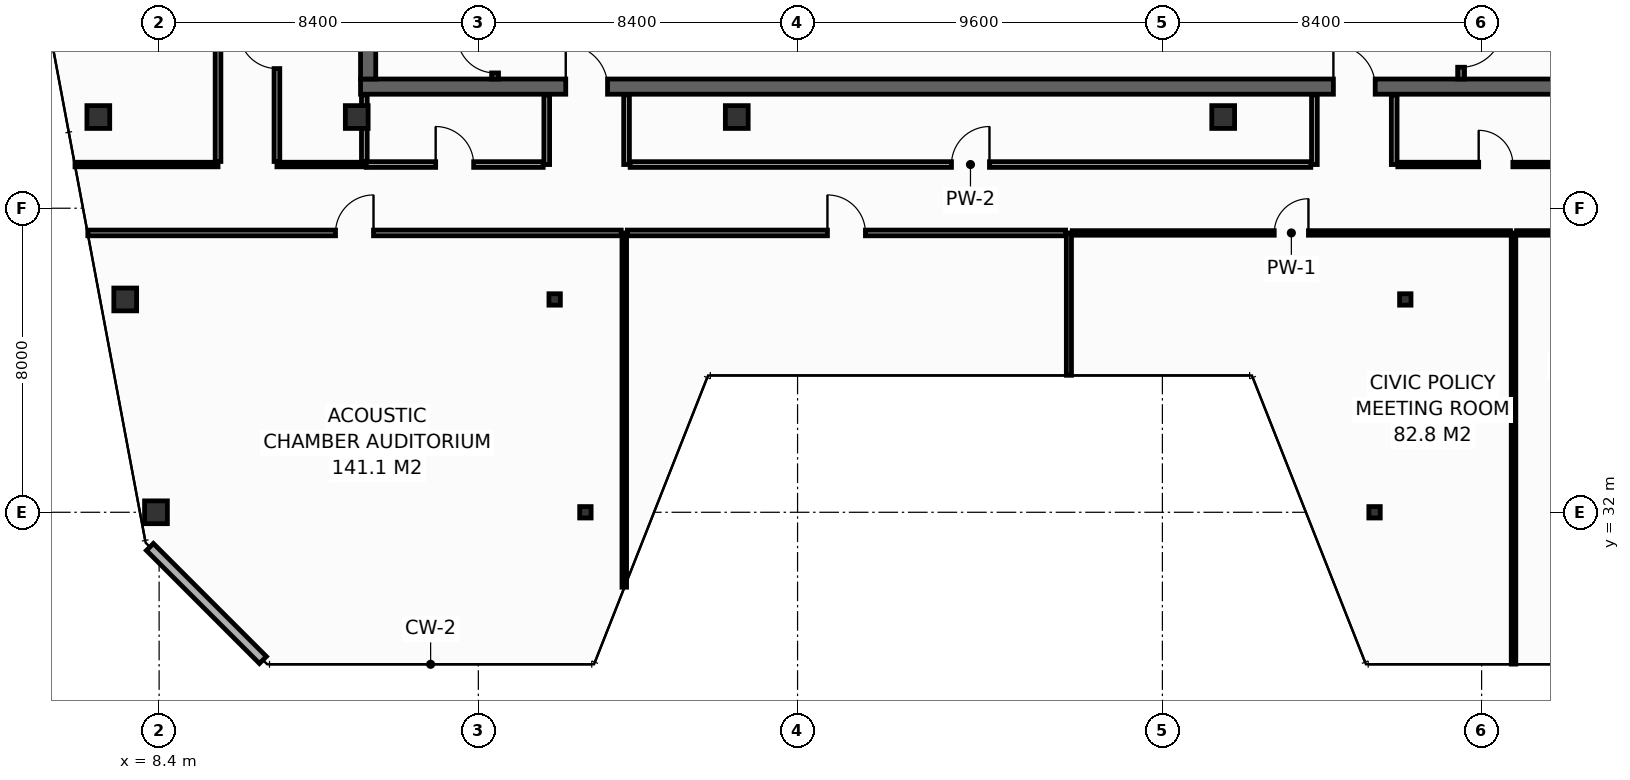
"""IFC4 building model, lengths in metres.
Left out: names, types, materials, properties, quantities, classifications, styles, units other than length and angle.
Written with IfcOpenShell. Run it as: python <this file> out.ifc"""

import sys

from ifc_helpers import new_model, si_unit, direction, frame, frame_2d, origin, origin_2d, place, context, subcontext, project, spatial, rectangle, hollow_rectangle, extrude, element, fill, save


model = new_model("IFC4")
c1 = context("Model", 3, precision=1e-05, world=origin(), true_north=direction((0.0, 1.0)))
c2 = subcontext(c1, "Body", "Model", "MODEL_VIEW")
j1 = project(units=[si_unit("LENGTHUNIT", "METRE"), si_unit("PLANEANGLEUNIT", "RADIAN")], contexts=[c1])
p1 = place(None, origin())
s1 = spatial("IfcSite", under=j1, at=p1, CompositionType="ELEMENT")
p2 = place(p1, origin())
s2 = spatial("IfcBuilding", under=s1, at=p2, CompositionType="ELEMENT")
p3 = place(p2, frame((0.0, 0.0, 287.6)))
s3 = spatial("IfcBuildingStorey", under=s2, at=p3, CompositionType="ELEMENT", Elevation=287.6)
p4 = place(p3, frame((13.7, 43.2, 0.0), z_axis=(0.0, 0.0, 1.0), x_axis=(1.0, 0.0, 0.0)))
e1 = element("IfcWall", 1, at=p4, inside=s3, PredefinedType="SHEAR", context=c2, shape_type="SweptSolid", body=[
    extrude(rectangle(XDim=32.5, YDim=0.4, at=frame_2d((16.25, 0.0))), origin(), (0.0, 0.0, 1.0), 3.55),
])
p5 = place(p4, frame((5.4, 0.0, 0.0)))
e2 = element("IfcOpeningElement", 2, at=p5, cuts=e1, PredefinedType="OPENING", context=c2, shape_type="SweptSolid", body=[
    extrude(rectangle(XDim=1.1, YDim=2.15, at=frame_2d((0.55, 1.075))), frame((0.0, 0.21, 0.0), z_axis=(0.0, -1.0, 0.0), x_axis=(1.0, 0.0, 0.0)), (0.0, 0.0, 1.0), 0.42),
])
p6 = place(p4, frame((25.6, 0.0, 0.0)))
e3 = element("IfcOpeningElement", 3, at=p6, cuts=e1, PredefinedType="OPENING", context=c2, shape_type="SweptSolid", body=[
    extrude(rectangle(XDim=1.1, YDim=2.15, at=frame_2d((0.55, 1.075))), frame((0.0, 0.21, 0.0), z_axis=(0.0, -1.0, 0.0), x_axis=(1.0, 0.0, 0.0)), (0.0, 0.0, 1.0), 0.42),
])
p7 = place(p3, frame((13.9, 43.4, 0.0), z_axis=(0.0, 0.0, 1.0), x_axis=(0.0, 1.0, 0.0)))
e4 = element("IfcWall", 4, at=p7, inside=s3, PredefinedType="SHEAR", context=c2, shape_type="SweptSolid", body=[
    extrude(rectangle(XDim=10.4, YDim=0.4, at=frame_2d((5.2, 0.0))), origin(), (0.0, 0.0, 1.0), 3.55),
])
for number, where, z_axis, x_axis in (
    (5, (6.8, 42.4, 0.0), (0.0, 0.0, 1.0), (1.0, 0.0, 0.0)),
    (6, (13.6, 42.4, 0.0), (0.0, 0.0, 1.0), (1.0, 0.0, 0.0)),
    (7, (23.6, 42.4, 0.0), (0.0, 0.0, 1.0), (1.0, 0.0, 0.0)),
    (8, (36.4, 42.4, 0.0), (0.0, 0.0, 1.0), (1.0, 0.0, 0.0)),
    (9, (8.317, 32.0, 0.0), (0.0, 0.0, 1.0), (1.0, 0.0, 0.0)),
):
    element("IfcColumn", number, at=place(p3, frame(where, z_axis=z_axis, x_axis=x_axis)), inside=s3, PredefinedType="COLUMN", context=c2, shape_type="SweptSolid", body=[
        extrude(hollow_rectangle(XDim=0.6, YDim=0.6, WallThickness=0.028, at=origin_2d()), origin(), (0.0, 0.0, 1.0), 3.8),
    ])
for number, where, z_axis, x_axis in (
    (10, (19.617, 32.0, 0.0), (0.0, 0.0, 1.0), (1.0, 0.0, 0.0)),
    (11, (40.383, 32.0, 0.0), (0.0, 0.0, 1.0), (1.0, 0.0, 0.0)),
):
    element("IfcColumn", number, at=place(p3, frame(where, z_axis=z_axis, x_axis=x_axis)), inside=s3, PredefinedType="COLUMN", context=c2, shape_type="SweptSolid", body=[
        extrude(hollow_rectangle(XDim=0.3, YDim=0.3, WallThickness=0.012, at=origin_2d()), origin(), (0.0, 0.0, 1.0), 3.8),
    ])
p8 = place(p3, frame((7.508, 37.6, 0.0), z_axis=(0.0, 0.0, 1.0), x_axis=(1.0, 0.0, 0.0)))
e12 = element("IfcColumn", 12, at=p8, inside=s3, PredefinedType="COLUMN", context=c2, shape_type="SweptSolid", body=[
    extrude(hollow_rectangle(XDim=0.6, YDim=0.6, WallThickness=0.028, at=origin_2d()), origin(), (0.0, 0.0, 1.0), 3.8),
])
for number, where, z_axis, x_axis in (
    (13, (18.808, 37.6, 0.0), (0.0, 0.0, 1.0), (1.0, 0.0, 0.0)),
    (14, (41.192, 37.6, 0.0), (0.0, 0.0, 1.0), (1.0, 0.0, 0.0)),
):
    element("IfcColumn", number, at=place(p3, frame(where, z_axis=z_axis, x_axis=x_axis)), inside=s3, PredefinedType="COLUMN", context=c2, shape_type="SweptSolid", body=[
        extrude(hollow_rectangle(XDim=0.3, YDim=0.3, WallThickness=0.012, at=origin_2d()), origin(), (0.0, 0.0, 1.0), 3.8),
    ])
p9 = place(p3, frame((17.24, 43.4, 0.0), z_axis=(0.0, 0.0, 1.0), x_axis=(0.0, 1.0, 0.0)))
e15 = element("IfcWall", 15, at=p9, inside=s3, PredefinedType="SHEAR", context=c2, shape_type="SweptSolid", body=[
    extrude(rectangle(XDim=10.4, YDim=0.18, at=frame_2d((5.2, 0.0))), origin(), (0.0, 0.0, 1.0), 3.55),
])
p10 = place(p9, frame((0.16, 0.0, 0.0)))
e16 = element("IfcOpeningElement", 16, at=p10, cuts=e15, PredefinedType="OPENING", context=c2, shape_type="SweptSolid", body=[
    extrude(rectangle(XDim=1.0, YDim=2.15, at=frame_2d((0.5, 1.075))), frame((0.0, 0.1, 0.0), z_axis=(0.0, -1.0, 0.0), x_axis=(1.0, 0.0, 0.0)), (0.0, 0.0, 1.0), 0.2),
])
p11 = place(p3, frame((42.66, 53.8, 0.0), z_axis=(0.0, 0.0, 1.0), x_axis=(0.0, -1.0, 0.0)))
e17 = element("IfcWall", 17, at=p11, inside=s3, PredefinedType="SHEAR", context=c2, shape_type="SweptSolid", body=[
    extrude(rectangle(XDim=10.4, YDim=0.18, at=frame_2d((5.2, 0.0))), origin(), (0.0, 0.0, 1.0), 3.55),
])
p12 = place(p11, frame((8.99, 0.0, 0.0)))
e18 = element("IfcOpeningElement", 18, at=p12, cuts=e17, PredefinedType="OPENING", context=c2, shape_type="SweptSolid", body=[
    extrude(rectangle(XDim=1.1, YDim=2.15, at=frame_2d((0.55, 1.075))), frame((0.0, 0.1, 0.0), z_axis=(0.0, -1.0, 0.0), x_axis=(1.0, 0.0, 0.0)), (0.0, 0.0, 1.0), 0.2),
])
p13 = place(p3, frame((8.157, 31.087, 0.0), z_axis=(0.0, 0.0, 1.0), x_axis=(0.707106781187, -0.707106781187, 0.0)))
e19 = element("IfcWall", 19, at=p13, inside=s3, PredefinedType="STANDARD", context=c2, shape_type="SweptSolid", body=[
    extrude(rectangle(XDim=4.206, YDim=0.26, at=frame_2d((2.103, 0.0))), origin(), (0.0, 0.0, 1.0), 3.55),
])
p14 = place(p3, frame((6.186, 41.15, 0.0), z_axis=(0.0, 0.0, 1.0), x_axis=(1.0, 0.0, 0.0)))
e20 = element("IfcWall", 20, at=p14, inside=s3, PredefinedType="PARTITIONING", context=c2, shape_type="SweptSolid", body=[
    extrude(rectangle(XDim=3.764, YDim=0.12, at=frame_2d((1.882, 0.0))), origin(), (0.0, 0.0, 1.0), 3.085),
])
p15 = place(p3, frame((11.5, 41.15, 0.0), z_axis=(0.0, 0.0, 1.0), x_axis=(1.0, 0.0, 0.0)))
e21 = element("IfcWall", 21, at=p15, inside=s3, PredefinedType="PARTITIONING", context=c2, shape_type="SweptSolid", body=[
    extrude(rectangle(XDim=2.35, YDim=0.12, at=frame_2d((1.175, 0.0))), origin(), (0.0, 0.0, 1.0), 3.55),
])
p16 = place(p3, frame((9.95, 41.23, 0.0), z_axis=(0.0, 0.0, 1.0), x_axis=(0.0, 1.0, 0.0)))
e22 = element("IfcWall", 22, at=p16, inside=s3, PredefinedType="PARTITIONING", context=c2, shape_type="SweptSolid", body=[
    extrude(rectangle(XDim=8.29, YDim=0.15, at=frame_2d((4.145, 0.0))), origin(), (0.0, 0.0, 1.0), 2.947),
])
p17 = place(p16, frame((3.645, 0.0, 0.0)))
e23 = element("IfcOpeningElement", 23, at=p17, cuts=e22, PredefinedType="OPENING", context=c2, shape_type="SweptSolid", body=[
    extrude(rectangle(XDim=1.0, YDim=2.15, at=frame_2d((0.5, 1.075))), frame((0.0, 0.085, 0.0), z_axis=(0.0, -1.0, 0.0), x_axis=(1.0, 0.0, 0.0)), (0.0, 0.0, 1.0), 0.17),
])
p18 = place(p3, frame((11.5, 41.23, 0.0), z_axis=(0.0, 0.0, 1.0), x_axis=(0.0, 1.0, 0.0)))
e24 = element("IfcWall", 24, at=p18, inside=s3, PredefinedType="PARTITIONING", context=c2, shape_type="SweptSolid", body=[
    extrude(rectangle(XDim=5.89, YDim=0.15, at=frame_2d((2.945, 0.0))), origin(), (0.0, 0.0, 1.0), 2.947),
])
p19 = place(p18, frame((2.445, 0.0, 0.0)))
e25 = element("IfcOpeningElement", 25, at=p19, cuts=e24, PredefinedType="OPENING", context=c2, shape_type="SweptSolid", body=[
    extrude(rectangle(XDim=1.0, YDim=2.15, at=frame_2d((0.5, 1.075))), frame((0.0, 0.085, 0.0), z_axis=(0.0, -1.0, 0.0), x_axis=(1.0, 0.0, 0.0)), (0.0, 0.0, 1.0), 0.17),
])
p20 = place(p3, frame((13.8, 41.23, 0.0), z_axis=(0.0, 0.0, 1.0), x_axis=(0.0, 1.0, 0.0)))
e26 = element("IfcWall", 26, at=p20, inside=s3, PredefinedType="PARTITIONING", context=c2, shape_type="SweptSolid", body=[
    extrude(rectangle(XDim=1.75, YDim=0.15, at=frame_2d((0.875, 0.0))), origin(), (0.0, 0.0, 1.0), 3.55),
])
for number, where, z_axis, x_axis in (
    (27, (18.6, 41.15, 0.0), (0.0, 0.0, 1.0), (0.0, 1.0, 0.0)),
    (28, (20.7, 41.15, 0.0), (0.0, 0.0, 1.0), (0.0, 1.0, 0.0)),
    (29, (38.8, 41.15, 0.0), (0.0, 0.0, 1.0), (0.0, 1.0, 0.0)),
    (30, (40.9, 41.15, 0.0), (0.0, 0.0, 1.0), (0.0, 1.0, 0.0)),
):
    element("IfcWall", number, at=place(p3, frame(where, z_axis=z_axis, x_axis=x_axis)), inside=s3, PredefinedType="PARTITIONING", context=c2, shape_type="SweptSolid", body=[
        extrude(rectangle(XDim=1.83, YDim=0.15, at=frame_2d((0.915, 0.0))), origin(), (0.0, 0.0, 1.0), 3.55),
    ])
p21 = place(p3, frame((13.85, 41.15, 0.0), z_axis=(0.0, 0.0, 1.0), x_axis=(1.0, 0.0, 0.0)))
e31 = element("IfcWall", 31, at=p21, inside=s3, PredefinedType="PARTITIONING", context=c2, shape_type="SweptSolid", body=[
    extrude(rectangle(XDim=4.655, YDim=0.15, at=frame_2d((2.327, 0.0))), origin(), (0.0, 0.0, 1.0), 3.55),
])
p22 = place(p21, frame((1.827, 0.0, 0.0)))
e32 = element("IfcOpeningElement", 32, at=p22, cuts=e31, PredefinedType="OPENING", context=c2, shape_type="SweptSolid", body=[
    extrude(rectangle(XDim=1.0, YDim=2.15, at=frame_2d((0.5, 1.075))), frame((0.0, 0.085, 0.0), z_axis=(0.0, -1.0, 0.0), x_axis=(1.0, 0.0, 0.0)), (0.0, 0.0, 1.0), 0.17),
])
p23 = place(p3, frame((20.795, 41.15, 0.0), z_axis=(0.0, 0.0, 1.0), x_axis=(1.0, 0.0, 0.0)))
e33 = element("IfcWall", 33, at=p23, inside=s3, PredefinedType="PARTITIONING", context=c2, shape_type="SweptSolid", body=[
    extrude(rectangle(XDim=17.91, YDim=0.15, at=frame_2d((8.955, 0.0))), origin(), (0.0, 0.0, 1.0), 3.047),
])
p24 = place(p23, frame((8.455, 0.0, 0.0)))
e34 = element("IfcOpeningElement", 34, at=p24, cuts=e33, PredefinedType="OPENING", context=c2, shape_type="SweptSolid", body=[
    extrude(rectangle(XDim=1.0, YDim=2.15, at=frame_2d((0.5, 1.075))), frame((0.0, 0.085, 0.0), z_axis=(0.0, -1.0, 0.0), x_axis=(1.0, 0.0, 0.0)), (0.0, 0.0, 1.0), 0.17),
])
p25 = place(p3, frame((40.995, 41.15, 0.0), z_axis=(0.0, 0.0, 1.0), x_axis=(1.0, 0.0, 0.0)))
e35 = element("IfcWall", 35, at=p25, inside=s3, PredefinedType="PARTITIONING", context=c2, shape_type="SweptSolid", body=[
    extrude(rectangle(XDim=5.155, YDim=0.12, at=frame_2d((2.577, 0.0))), origin(), (0.0, 0.0, 1.0), 3.55),
])
p26 = place(p25, frame((2.128, 0.0, 0.0)))
e36 = element("IfcOpeningElement", 36, at=p26, cuts=e35, PredefinedType="OPENING", context=c2, shape_type="SweptSolid", body=[
    extrude(rectangle(XDim=0.9, YDim=2.1, at=frame_2d((0.45, 1.05))), frame((0.0, 0.07, 0.0), z_axis=(0.0, -1.0, 0.0), x_axis=(1.0, 0.0, 0.0)), (0.0, 0.0, 1.0), 0.14),
])
p27 = place(p3, frame((20.64, 30.029, 0.0), z_axis=(0.0, 0.0, 1.0), x_axis=(0.0, 1.0, 0.0)))
e37 = element("IfcWall", 37, at=p27, inside=s3, PredefinedType="PARTITIONING", context=c2, shape_type="SweptSolid", body=[
    extrude(rectangle(XDim=9.321, YDim=0.12, at=frame_2d((4.661, 0.0))), origin(), (0.0, 0.0, 1.0), 3.047),
])
p28 = place(p3, frame((32.34, 35.605, 0.0), z_axis=(0.0, 0.0, 1.0), x_axis=(0.0, 1.0, 0.0)))
e38 = element("IfcWall", 38, at=p28, inside=s3, PredefinedType="PARTITIONING", context=c2, shape_type="SweptSolid", body=[
    extrude(rectangle(XDim=3.745, YDim=0.135, at=frame_2d((1.873, 0.0))), origin(), (0.0, 0.0, 1.0), 3.55),
])
p29 = place(p3, frame((44.04, 28.005, 0.0), z_axis=(0.0, 0.0, 1.0), x_axis=(0.0, 1.0, 0.0)))
e39 = element("IfcWall", 39, at=p29, inside=s3, PredefinedType="PARTITIONING", context=c2, shape_type="SweptSolid", body=[
    extrude(rectangle(XDim=11.345, YDim=0.12, at=frame_2d((5.673, 0.0))), origin(), (0.0, 0.0, 1.0), 3.047),
])
p30 = place(p3, frame((6.523, 39.35, 0.0), z_axis=(0.0, 0.0, 1.0), x_axis=(1.0, 0.0, 0.0)))
e40 = element("IfcWall", 40, at=p30, inside=s3, PredefinedType="PARTITIONING", context=c2, shape_type="SweptSolid", body=[
    extrude(rectangle(XDim=14.037, YDim=0.15, at=frame_2d((7.018, 0.0))), origin(), (0.0, 0.0, 1.0), 3.047),
])
p31 = place(p30, frame((6.518, 0.0, 0.0)))
e41 = element("IfcOpeningElement", 41, at=p31, cuts=e40, PredefinedType="OPENING", context=c2, shape_type="SweptSolid", body=[
    extrude(rectangle(XDim=1.0, YDim=2.15, at=frame_2d((0.5, 1.075))), frame((0.0, 0.085, 0.0), z_axis=(0.0, -1.0, 0.0), x_axis=(1.0, 0.0, 0.0)), (0.0, 0.0, 1.0), 0.17),
])
p32 = place(p3, frame((20.72, 39.35, 0.0), z_axis=(0.0, 0.0, 1.0), x_axis=(1.0, 0.0, 0.0)))
e42 = element("IfcWall", 42, at=p32, inside=s3, PredefinedType="PARTITIONING", context=c2, shape_type="SweptSolid", body=[
    extrude(rectangle(XDim=11.532, YDim=0.15, at=frame_2d((5.766, 0.0))), origin(), (0.0, 0.0, 1.0), 3.047),
])
p33 = place(p32, frame((5.266, 0.0, 0.0)))
e43 = element("IfcOpeningElement", 43, at=p33, cuts=e42, PredefinedType="OPENING", context=c2, shape_type="SweptSolid", body=[
    extrude(rectangle(XDim=1.0, YDim=2.15, at=frame_2d((0.5, 1.075))), frame((0.0, 0.085, 0.0), z_axis=(0.0, -1.0, 0.0), x_axis=(1.0, 0.0, 0.0)), (0.0, 0.0, 1.0), 0.17),
])
p34 = place(p3, frame((32.427, 39.35, 0.0), z_axis=(0.0, 0.0, 1.0), x_axis=(1.0, 0.0, 0.0)))
e44 = element("IfcWall", 44, at=p34, inside=s3, PredefinedType="PARTITIONING", context=c2, shape_type="SweptSolid", body=[
    extrude(rectangle(XDim=11.532, YDim=0.12, at=frame_2d((5.766, 0.0))), origin(), (0.0, 0.0, 1.0), 3.047),
])
p35 = place(p34, frame((5.316, 0.0, 0.0)))
e45 = element("IfcOpeningElement", 45, at=p35, cuts=e44, PredefinedType="OPENING", context=c2, shape_type="SweptSolid", body=[
    extrude(rectangle(XDim=0.9, YDim=2.1, at=frame_2d((0.45, 1.05))), frame((0.0, 0.07, 0.0), z_axis=(0.0, -1.0, 0.0), x_axis=(1.0, 0.0, 0.0)), (0.0, 0.0, 1.0), 0.14),
])
p36 = place(p3, frame((44.12, 39.35, 0.0), z_axis=(0.0, 0.0, 1.0), x_axis=(1.0, 0.0, 0.0)))
e46 = element("IfcWall", 46, at=p36, inside=s3, PredefinedType="PARTITIONING", context=c2, shape_type="SweptSolid", body=[
    extrude(rectangle(XDim=9.356, YDim=0.12, at=frame_2d((4.678, 0.0))), origin(), (0.0, 0.0, 1.0), 3.085),
])
p37 = place(p36, frame((4.228, 0.0, 0.0)))
e47 = element("IfcOpeningElement", 47, at=p37, cuts=e46, PredefinedType="OPENING", context=c2, shape_type="SweptSolid", body=[
    extrude(rectangle(XDim=0.9, YDim=2.1, at=frame_2d((0.45, 1.05))), frame((0.0, 0.07, 0.0), z_axis=(0.0, -1.0, 0.0), x_axis=(1.0, 0.0, 0.0)), (0.0, 0.0, 1.0), 0.14),
])
p38 = place(p10, origin())
e48 = element("IfcDoor", 48, at=p38, inside=s3, OperationType="SINGLE_SWING_RIGHT", PredefinedType="DOOR", context=c2, shape_type="SweptSolid", body=[
    extrude(rectangle(XDim=1.0, YDim=2.15, at=frame_2d((0.5, 1.075))), frame((0.0, 0.025, 0.0), z_axis=(0.0, -1.0, 0.0), x_axis=(1.0, 0.0, 0.0)), (0.0, 0.0, 1.0), 0.05),
])
fill(e16, e48)
p39 = place(p12, origin())
e49 = element("IfcDoor", 49, at=p39, inside=s3, OperationType="SINGLE_SWING_LEFT", PredefinedType="DOOR", context=c2, shape_type="SweptSolid", body=[
    extrude(rectangle(XDim=1.1, YDim=2.15, at=frame_2d((0.55, 1.075))), frame((0.0, 0.025, 0.0), z_axis=(0.0, -1.0, 0.0), x_axis=(1.0, 0.0, 0.0)), (0.0, 0.0, 1.0), 0.05),
])
fill(e18, e49)
p40 = place(p5, origin())
e50 = element("IfcDoor", 50, at=p40, inside=s3, OperationType="SINGLE_SWING_LEFT", PredefinedType="DOOR", context=c2, shape_type="SweptSolid", body=[
    extrude(rectangle(XDim=1.1, YDim=2.15, at=frame_2d((0.55, 1.075))), frame((0.0, 0.025, 0.0), z_axis=(0.0, -1.0, 0.0), x_axis=(1.0, 0.0, 0.0)), (0.0, 0.0, 1.0), 0.05),
])
fill(e2, e50)
p41 = place(p6, origin())
e51 = element("IfcDoor", 51, at=p41, inside=s3, OperationType="SINGLE_SWING_LEFT", PredefinedType="DOOR", context=c2, shape_type="SweptSolid", body=[
    extrude(rectangle(XDim=1.1, YDim=2.15, at=frame_2d((0.55, 1.075))), frame((0.0, 0.025, 0.0), z_axis=(0.0, -1.0, 0.0), x_axis=(1.0, 0.0, 0.0)), (0.0, 0.0, 1.0), 0.05),
])
fill(e3, e51)
p42 = place(p19, origin())
e52 = element("IfcDoor", 52, at=p42, inside=s3, OperationType="SINGLE_SWING_RIGHT", PredefinedType="DOOR", context=c2, shape_type="SweptSolid", body=[
    extrude(rectangle(XDim=1.0, YDim=2.15, at=frame_2d((0.5, 1.075))), frame((0.0, 0.025, 0.0), z_axis=(0.0, -1.0, 0.0), x_axis=(1.0, 0.0, 0.0)), (0.0, 0.0, 1.0), 0.05),
])
fill(e25, e52)
p43 = place(p22, origin())
e53 = element("IfcDoor", 53, at=p43, inside=s3, OperationType="SINGLE_SWING_LEFT", PredefinedType="DOOR", context=c2, shape_type="SweptSolid", body=[
    extrude(rectangle(XDim=1.0, YDim=2.15, at=frame_2d((0.5, 1.075))), frame((0.0, 0.025, 0.0), z_axis=(0.0, -1.0, 0.0), x_axis=(1.0, 0.0, 0.0)), (0.0, 0.0, 1.0), 0.05),
])
fill(e32, e53)
p44 = place(p24, origin())
e54 = element("IfcDoor", 54, at=p44, inside=s3, OperationType="SINGLE_SWING_RIGHT", PredefinedType="DOOR", context=c2, shape_type="SweptSolid", body=[
    extrude(rectangle(XDim=1.0, YDim=2.15, at=frame_2d((0.5, 1.075))), frame((0.0, 0.025, 0.0), z_axis=(0.0, -1.0, 0.0), x_axis=(1.0, 0.0, 0.0)), (0.0, 0.0, 1.0), 0.05),
])
fill(e34, e54)
p45 = place(p26, origin())
e55 = element("IfcDoor", 55, at=p45, inside=s3, OperationType="SINGLE_SWING_LEFT", PredefinedType="DOOR", context=c2, shape_type="SweptSolid", body=[
    extrude(rectangle(XDim=0.9, YDim=2.1, at=frame_2d((0.45, 1.05))), frame((0.0, 0.025, 0.0), z_axis=(0.0, -1.0, 0.0), x_axis=(1.0, 0.0, 0.0)), (0.0, 0.0, 1.0), 0.05),
])
fill(e36, e55)
p46 = place(p31, origin())
e56 = element("IfcDoor", 56, at=p46, inside=s3, OperationType="SINGLE_SWING_RIGHT", PredefinedType="DOOR", context=c2, shape_type="SweptSolid", body=[
    extrude(rectangle(XDim=1.0, YDim=2.15, at=frame_2d((0.5, 1.075))), frame((0.0, 0.025, 0.0), z_axis=(0.0, -1.0, 0.0), x_axis=(1.0, 0.0, 0.0)), (0.0, 0.0, 1.0), 0.05),
])
fill(e41, e56)
p47 = place(p33, origin())
e57 = element("IfcDoor", 57, at=p47, inside=s3, OperationType="SINGLE_SWING_LEFT", PredefinedType="DOOR", context=c2, shape_type="SweptSolid", body=[
    extrude(rectangle(XDim=1.0, YDim=2.15, at=frame_2d((0.5, 1.075))), frame((0.0, 0.025, 0.0), z_axis=(0.0, -1.0, 0.0), x_axis=(1.0, 0.0, 0.0)), (0.0, 0.0, 1.0), 0.05),
])
fill(e43, e57)
p48 = place(p35, origin())
e58 = element("IfcDoor", 58, at=p48, inside=s3, OperationType="SINGLE_SWING_RIGHT", PredefinedType="DOOR", context=c2, shape_type="SweptSolid", body=[
    extrude(rectangle(XDim=0.9, YDim=2.1, at=frame_2d((0.45, 1.05))), frame((0.0, 0.025, 0.0), z_axis=(0.0, -1.0, 0.0), x_axis=(1.0, 0.0, 0.0)), (0.0, 0.0, 1.0), 0.05),
])
fill(e45, e58)
save(model, sys.argv[1])
